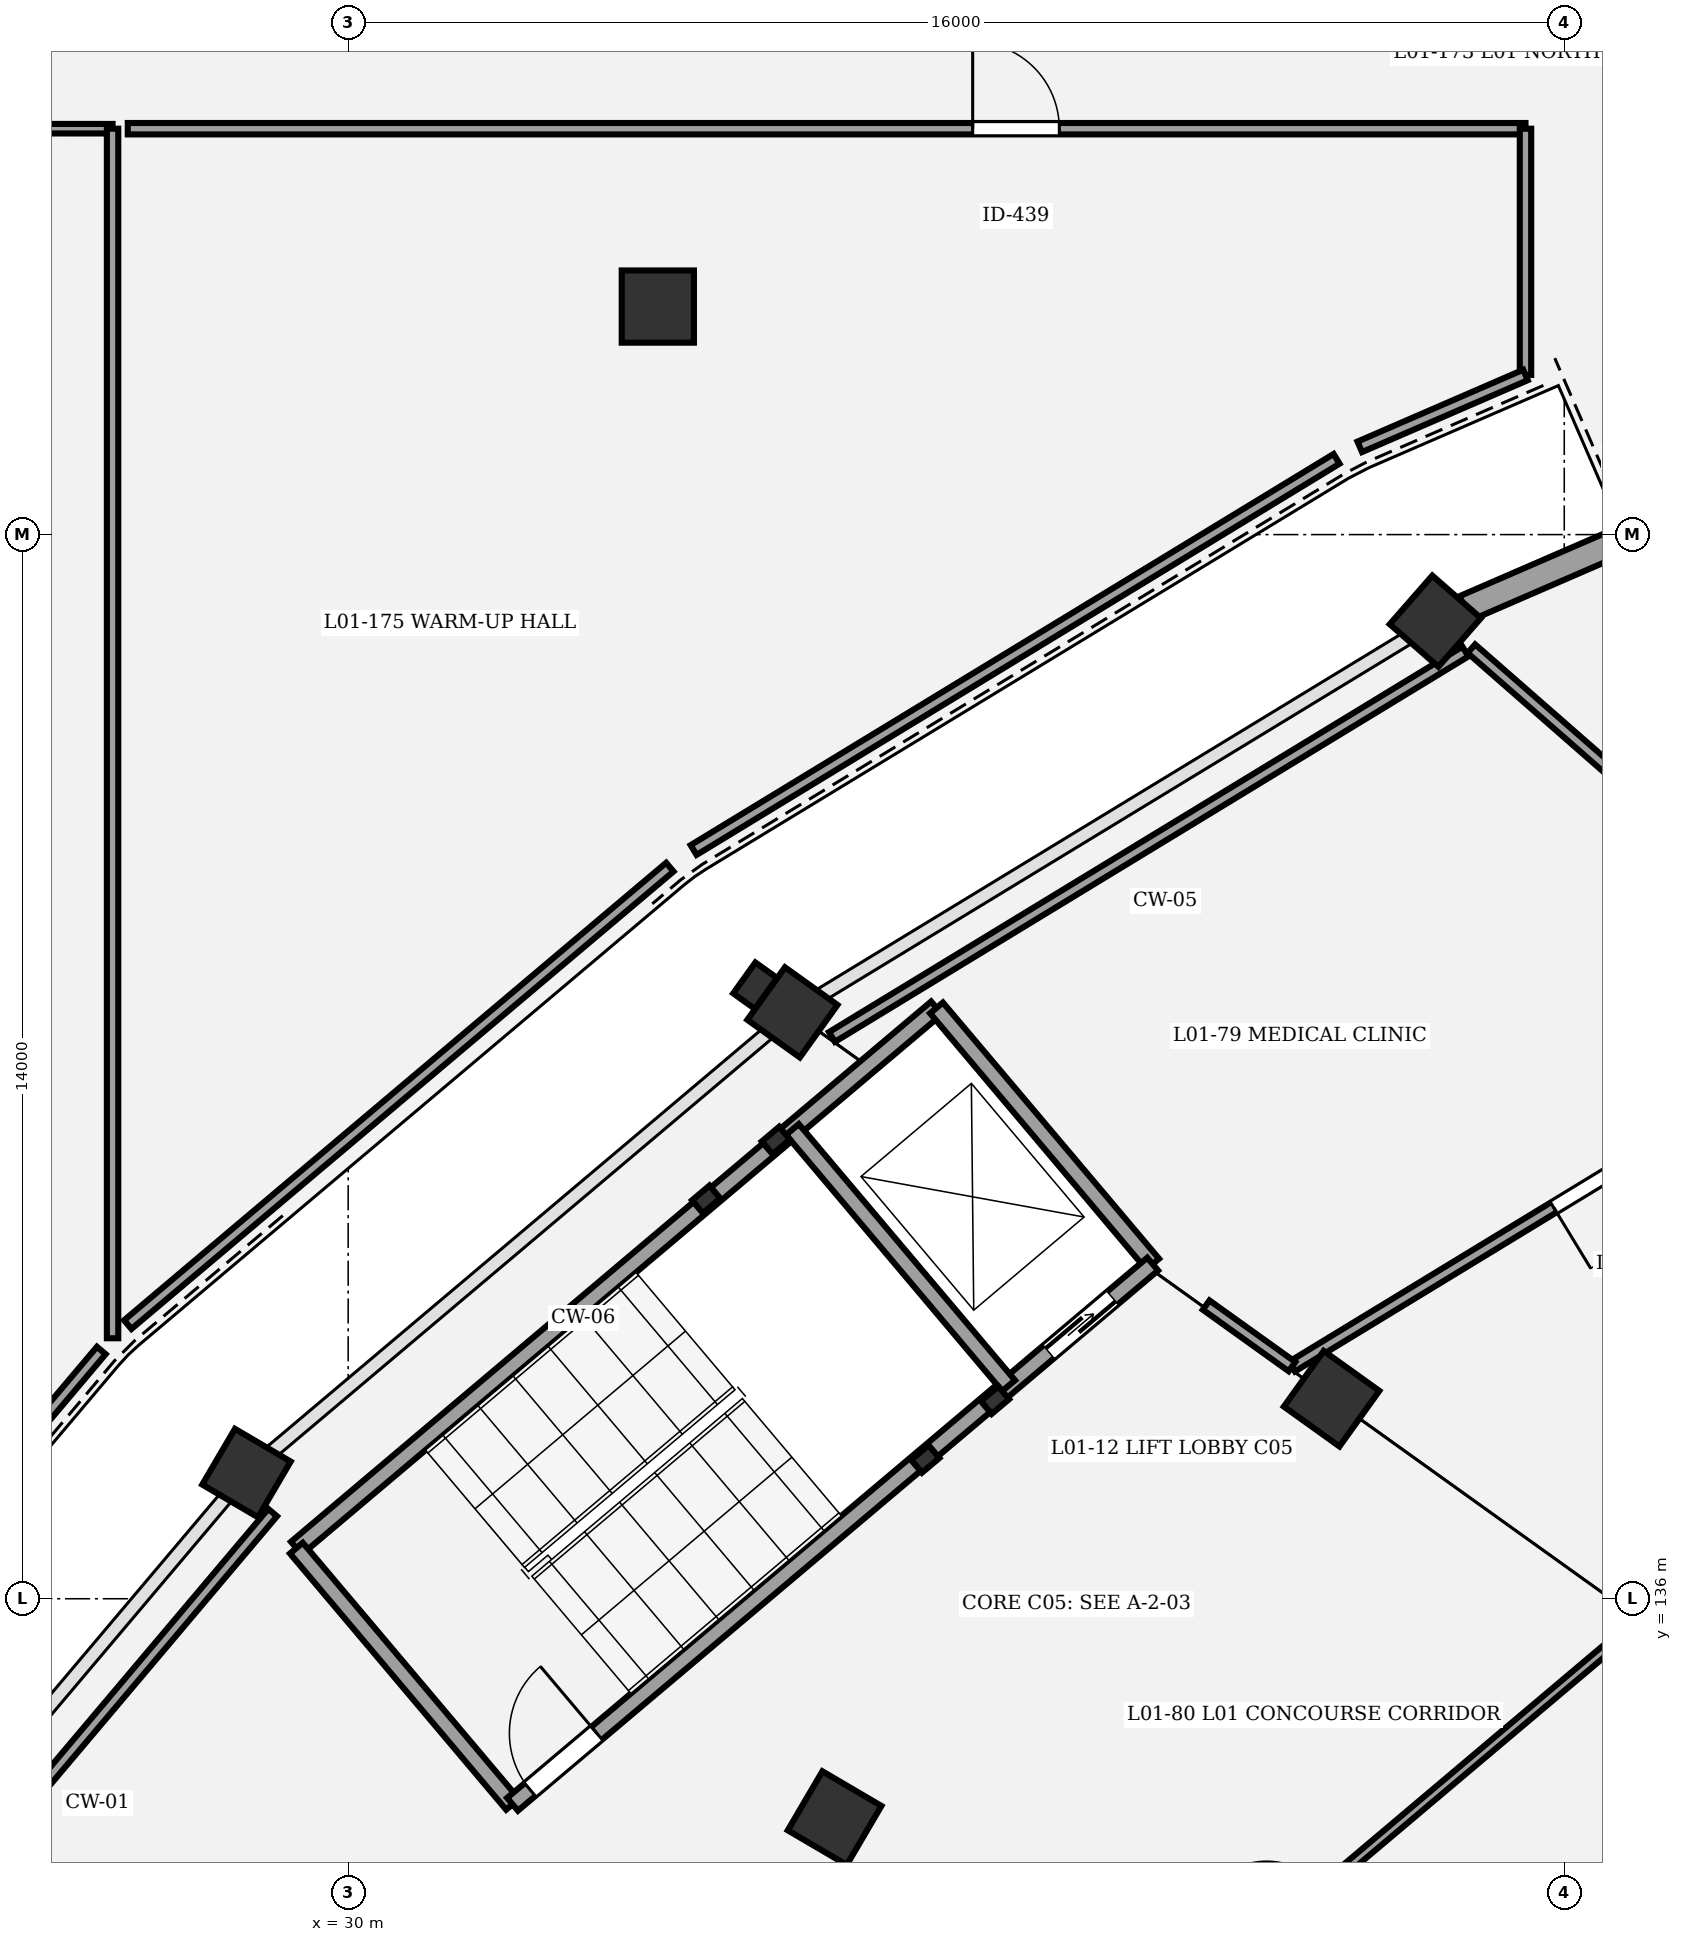
"""IFC4 building model, lengths in metres.
Left out: names, types, materials, properties, quantities, classifications, styles, units other than length and angle.
Written with IfcOpenShell. Run it as: python <this file> out.ifc"""

import sys

from ifc_helpers import new_model, si_unit, direction, frame, frame_2d, origin, origin_2d, place, context, subcontext, project, spatial, rectangle, circle, extrude, element, fill, save


model = new_model("IFC4")
c1 = context("Model", 3, precision=1e-05, world=origin(), true_north=direction((0.0, 1.0)))
c2 = subcontext(c1, "Body", "Model", "MODEL_VIEW")
j1 = project(units=[si_unit("LENGTHUNIT", "METRE"), si_unit("PLANEANGLEUNIT", "RADIAN")], contexts=[c1])
p1 = place(None, origin())
s1 = spatial("IfcSite", under=j1, at=p1, CompositionType="ELEMENT")
p2 = place(p1, origin())
s2 = spatial("IfcBuilding", under=s1, at=p2, CompositionType="ELEMENT")
p3 = place(p2, frame((0.0, 0.0, 5.4)))
s3 = spatial("IfcBuildingStorey", under=s2, at=p3, CompositionType="ELEMENT", Elevation=5.4)
p4 = place(p3, frame((44.304, 148.861, 0.0), z_axis=(0.0, 0.0, 1.0), x_axis=(-0.752529860433, 0.658558128912, 0.0)))
e1 = element("IfcColumn", 1, at=p4, inside=s3, PredefinedType="COLUMN", context=c2, shape_type="SweptSolid", body=[
    extrude(rectangle(XDim=0.85, YDim=0.85, at=origin_2d()), origin(), (0.0, 0.0, 1.0), 4.8),
])
p5 = place(p3, frame((42.939, 138.632, 0.0), z_axis=(0.0, 0.0, 1.0), x_axis=(-0.812897512265, 0.582406760395, 0.0)))
e2 = element("IfcColumn", 2, at=p5, inside=s3, PredefinedType="COLUMN", context=c2, shape_type="SweptSolid", body=[
    extrude(rectangle(XDim=0.9, YDim=0.9, at=origin_2d()), origin(), (0.0, 0.0, 1.0), 4.8),
])
p6 = place(p3, frame((35.844, 143.715, 0.0), z_axis=(0.0, 0.0, 1.0), x_axis=(-0.812897512265, 0.582406760395, 0.0)))
e3 = element("IfcColumn", 3, at=p6, inside=s3, PredefinedType="COLUMN", context=c2, shape_type="SweptSolid", body=[
    extrude(rectangle(XDim=0.85, YDim=0.85, at=origin_2d()), origin(), (0.0, 0.0, 1.0), 4.8),
])
p7 = place(p3, frame((35.354, 144.066, 0.0), z_axis=(0.0, 0.0, 1.0), x_axis=(-0.582406760395, -0.812897512265, 0.0)))
e4 = element("IfcColumn", 4, at=p7, inside=s3, PredefinedType="PILASTER", context=c2, shape_type="SweptSolid", body=[
    extrude(rectangle(XDim=0.5, YDim=0.35, at=origin_2d()), origin(), (0.0, 0.0, 1.0), 4.8),
])
p8 = place(p3, frame((36.4, 133.114, 0.0), z_axis=(0.0, 0.0, 1.0), x_axis=(-0.862513669207, 0.506033764121, 0.0)))
e5 = element("IfcColumn", 5, at=p8, inside=s3, PredefinedType="COLUMN", context=c2, shape_type="SweptSolid", body=[
    extrude(rectangle(XDim=0.9, YDim=0.9, at=origin_2d()), origin(), (0.0, 0.0, 1.0), 4.8),
])
p9 = place(p3, frame((28.662, 137.654, 0.0), z_axis=(0.0, 0.0, 1.0), x_axis=(-0.862513669207, 0.506033764121, 0.0)))
e6 = element("IfcColumn", 6, at=p9, inside=s3, PredefinedType="COLUMN", context=c2, shape_type="SweptSolid", body=[
    extrude(rectangle(XDim=0.85, YDim=0.85, at=origin_2d()), origin(), (0.0, 0.0, 1.0), 4.8),
])
p10 = place(p3, frame((34.074, 153.0, 0.0), z_axis=(0.0, 0.0, 1.0), x_axis=(1.0, 0.0, 0.0)))
e7 = element("IfcColumn", 7, at=p10, inside=s3, PredefinedType="COLUMN", context=c2, shape_type="SweptSolid", body=[
    extrude(circle(Radius=0.475, at=origin_2d()), origin(), (0.0, 0.0, 1.0), 4.8),
])
p11 = place(p3, frame((44.692, 149.029, 0.0), z_axis=(0.0, 0.0, 1.0), x_axis=(0.91749374913, 0.397750198375, 0.0)))
e8 = element("IfcWall", 8, at=p11, inside=s3, PredefinedType="STANDARD", context=c2, shape_type="SweptSolid", body=[
    extrude(rectangle(XDim=9.79, YDim=0.35, at=frame_2d((4.895, 0.0))), origin(), (0.0, 0.0, 1.0), 3.57),
])
p12 = place(p11, frame((3.995, 0.0, 0.0)))
e9 = element("IfcOpeningElement", 9, at=p12, cuts=e8, PredefinedType="OPENING", context=c2, shape_type="SweptSolid", body=[
    extrude(rectangle(XDim=1.8, YDim=2.4, at=frame_2d((0.9, 1.2))), frame((0.0, 0.185, 0.0), z_axis=(0.0, -1.0, 0.0), x_axis=(1.0, 0.0, 0.0)), (0.0, 0.0, 1.0), 0.37),
])
for number, where, z_axis, x_axis in (
    (10, (37.593, 137.839, 0.0), (0.0, 0.0, 1.0), (0.764, 0.645, 0.0)),
    (11, (38.51, 138.613, 0.0), (0.0, 0.0, 1.0), (0.764, 0.645, 0.0)),
    (12, (35.627, 142.029, 0.0), (0.0, 0.0, 1.0), (0.764, 0.645, 0.0)),
    (13, (34.71, 141.255, 0.0), (0.0, 0.0, 1.0), (0.764, 0.645, 0.0)),
):
    element("IfcColumn", number, at=place(p3, frame(where, z_axis=z_axis, x_axis=x_axis)), inside=s3, PredefinedType="COLUMN", context=c2, shape_type="SweptSolid", body=[
        extrude(rectangle(XDim=0.3, YDim=0.22, at=origin_2d()), origin(), (0.0, 0.0, 1.0), 4.8),
    ])
p13 = place(p3, frame((29.319, 136.666, 0.0), z_axis=(0.0, 0.0, 1.0), x_axis=(0.764247804305, 0.644922703598, 0.0)))
e14 = element("IfcWall", 14, at=p13, inside=s3, PredefinedType="SHEAR", context=c2, shape_type="SweptSolid", body=[
    extrude(rectangle(XDim=11.02, YDim=0.22, at=frame_2d((5.51, 0.0))), origin(), (0.0, 0.0, 1.0), 4.55),
])
p14 = place(p3, frame((32.163, 133.296, 0.0), z_axis=(0.0, 0.0, 1.0), x_axis=(-0.644904288042, 0.764263344185, 0.0)))
e15 = element("IfcWall", 15, at=p14, inside=s3, PredefinedType="SHEAR", context=c2, shape_type="SweptSolid", body=[
    extrude(rectangle(XDim=4.41, YDim=0.22, at=frame_2d((2.205, 0.0))), origin(), (0.0, 0.0, 1.0), 4.55),
])
p15 = place(p3, frame((40.585, 140.403, 0.0), z_axis=(0.0, 0.0, 1.0), x_axis=(-0.644936622785, 0.764236058159, 0.0)))
e16 = element("IfcWall", 16, at=p15, inside=s3, PredefinedType="SHEAR", context=c2, shape_type="SweptSolid", body=[
    extrude(rectangle(XDim=4.41, YDim=0.22, at=frame_2d((2.205, 0.0))), origin(), (0.0, 0.0, 1.0), 4.55),
])
p16 = place(p3, frame((32.163, 133.296, 0.0), z_axis=(0.0, 0.0, 1.0), x_axis=(0.764257018762, 0.644911784102, 0.0)))
e17 = element("IfcWall", 17, at=p16, inside=s3, PredefinedType="SHEAR", context=c2, shape_type="SweptSolid", body=[
    extrude(rectangle(XDim=11.02, YDim=0.22, at=frame_2d((5.51, 0.0))), origin(), (0.0, 0.0, 1.0), 4.55),
])
p17 = place(p16, frame((0.3, 0.0, 0.0)))
e18 = element("IfcOpeningElement", 18, at=p17, cuts=e17, PredefinedType="OPENING", context=c2, shape_type="SweptSolid", body=[
    extrude(rectangle(XDim=1.15, YDim=2.15, at=frame_2d((0.575, 1.075))), frame((0.0, 0.12, 0.0), z_axis=(0.0, -1.0, 0.0), x_axis=(1.0, 0.0, 0.0)), (0.0, 0.0, 1.0), 0.24),
])
p18 = place(p16, frame((9.23, 0.0, 0.0)))
e19 = element("IfcOpeningElement", 19, at=p18, cuts=e17, PredefinedType="OPENING", context=c2, shape_type="SweptSolid", body=[
    extrude(rectangle(XDim=1.1, YDim=2.15, at=frame_2d((0.55, 1.075))), frame((0.0, 0.12, 0.0), z_axis=(0.0, -1.0, 0.0), x_axis=(1.0, 0.0, 0.0)), (0.0, 0.0, 1.0), 0.24),
])
p19 = place(p3, frame((38.689, 138.803, 0.0), z_axis=(0.0, 0.0, 1.0), x_axis=(-0.644904288042, 0.764263344185, 0.0)))
e20 = element("IfcWall", 20, at=p19, inside=s3, PredefinedType="SHEAR", context=c2, shape_type="SweptSolid", body=[
    extrude(rectangle(XDim=4.41, YDim=0.22, at=frame_2d((2.205, 0.0))), origin(), (0.0, 0.0, 1.0), 4.55),
])
p20 = place(p3, frame((50.105, 143.731, 0.0), z_axis=(0.0, 0.0, 1.0), x_axis=(-0.854321649351, -0.519744667554, 0.0)))
e21 = element("IfcWall", 21, at=p20, inside=s3, PredefinedType="PARTITIONING", context=c2, shape_type="SweptSolid", body=[
    extrude(rectangle(XDim=8.999, YDim=0.15, at=frame_2d((4.499, 0.0))), origin(), (0.0, 0.0, 1.0), 3.55),
])
p21 = place(p20, frame((4.029, 0.0, 0.0)))
e22 = element("IfcOpeningElement", 22, at=p21, cuts=e21, PredefinedType="OPENING", context=c2, shape_type="SweptSolid", body=[
    extrude(rectangle(XDim=0.94, YDim=2.1, at=frame_2d((0.47, 1.05))), frame((0.0, 0.085, 0.0), z_axis=(0.0, -1.0, 0.0), x_axis=(1.0, 0.0, 0.0)), (0.0, 0.0, 1.0), 0.17),
])
p22 = place(p3, frame((40.867, 130.539, 0.0), z_axis=(0.0, 0.0, 1.0), x_axis=(0.764249122867, 0.644921141068, 0.0)))
e23 = element("IfcWall", 23, at=p22, inside=s3, PredefinedType="PARTITIONING", context=c2, shape_type="SweptSolid", body=[
    extrude(rectangle(XDim=7.99, YDim=0.125, at=frame_2d((3.995, 0.0))), origin(), (0.0, 0.0, 1.0), 3.55),
])
p23 = place(p22, frame((1.594, 0.0, 0.0)))
e24 = element("IfcOpeningElement", 24, at=p23, cuts=e23, PredefinedType="OPENING", context=c2, shape_type="SweptSolid", body=[
    extrude(rectangle(XDim=0.98, YDim=2.1, at=frame_2d((0.49, 1.05))), frame((0.0, 0.073, 0.0), z_axis=(0.0, -1.0, 0.0), x_axis=(1.0, 0.0, 0.0)), (0.0, 0.0, 1.0), 0.145),
])
p24 = place(p3, frame((13.469, 155.343, 0.0), z_axis=(0.0, 0.0, 1.0), x_axis=(0.99999997621, -0.00021812629, 0.0)))
e25 = element("IfcWall", 25, at=p24, inside=s3, PredefinedType="PARTITIONING", context=c2, shape_type="SweptSolid", body=[
    extrude(rectangle(XDim=13.431, YDim=0.125, at=frame_2d((6.716, 0.0))), origin(), (0.0, 0.0, 1.0), 3.55),
])
p25 = place(p24, frame((7.919, 0.0, 0.0)))
e26 = element("IfcOpeningElement", 26, at=p25, cuts=e25, PredefinedType="OPENING", context=c2, shape_type="SweptSolid", body=[
    extrude(rectangle(XDim=1.1, YDim=2.1, at=frame_2d((0.55, 1.05))), frame((0.0, 0.073, 0.0), z_axis=(0.0, -1.0, 0.0), x_axis=(1.0, 0.0, 0.0)), (0.0, 0.0, 1.0), 0.145),
])
p26 = place(p3, frame((27.1, 155.34, 0.0), z_axis=(0.0, 0.0, 1.0), x_axis=(1.0, 0.0, 0.0)))
e27 = element("IfcWall", 27, at=p26, inside=s3, PredefinedType="PARTITIONING", context=c2, shape_type="SweptSolid", body=[
    extrude(rectangle(XDim=18.39, YDim=0.15, at=frame_2d((9.195, 0.0))), origin(), (0.0, 0.0, 1.0), 3.55),
])
p27 = place(p26, frame((11.116, 0.0, 0.0)))
e28 = element("IfcOpeningElement", 28, at=p27, cuts=e27, PredefinedType="OPENING", context=c2, shape_type="SweptSolid", body=[
    extrude(rectangle(XDim=1.14, YDim=2.1, at=frame_2d((0.57, 1.05))), frame((0.0, 0.085, 0.0), z_axis=(0.0, -1.0, 0.0), x_axis=(1.0, 0.0, 0.0)), (0.0, 0.0, 1.0), 0.17),
])
p28 = place(p3, frame((50.18, 143.772, 0.0), z_axis=(0.0, 0.0, 1.0), x_axis=(-0.752576694707, 0.658504607869, 0.0)))
e29 = element("IfcWall", 29, at=p28, inside=s3, PredefinedType="PARTITIONING", context=c2, shape_type="SweptSolid", body=[
    extrude(rectangle(XDim=7.178, YDim=0.15, at=frame_2d((3.589, 0.0))), origin(), (0.0, 0.0, 1.0), 3.55),
])
p29 = place(p3, frame((36.365, 143.391, 0.0), z_axis=(0.0, 0.0, 1.0), x_axis=(0.854323689683, 0.519741313777, 0.0)))
e30 = element("IfcWall", 30, at=p29, inside=s3, PredefinedType="PARTITIONING", context=c2, shape_type="SweptSolid", body=[
    extrude(rectangle(XDim=9.756, YDim=0.15, at=frame_2d((4.878, 0.0))), origin(), (0.0, 0.0, 1.0), 3.55),
])
p30 = place(p3, frame((42.418, 139.054, 0.0), z_axis=(0.0, 0.0, 1.0), x_axis=(-0.812925279681, 0.582368001916, 0.0)))
e31 = element("IfcWall", 31, at=p30, inside=s3, PredefinedType="PARTITIONING", context=c2, shape_type="SweptSolid", body=[
    extrude(rectangle(XDim=1.389, YDim=0.15, at=frame_2d((0.695, 0.0))), origin(), (0.0, 0.0, 1.0), 3.55),
])
p31 = place(p3, frame((23.344, 130.428, 0.0), z_axis=(0.0, 0.0, 1.0), x_axis=(0.645169991826, 0.764039057671, 0.0)))
e32 = element("IfcWall", 32, at=p31, inside=s3, PredefinedType="PARTITIONING", context=c2, shape_type="SweptSolid", body=[
    extrude(rectangle(XDim=8.776, YDim=0.15, at=frame_2d((4.388, 0.0))), origin(), (0.0, 0.0, 1.0), 3.55),
])
p32 = place(p3, frame((26.752, 139.266, 0.0), z_axis=(0.0, 0.0, 1.0), x_axis=(-0.645180125691, -0.764030500316, 0.0)))
e33 = element("IfcWall", 33, at=p32, inside=s3, PredefinedType="PARTITIONING", context=c2, shape_type="SweptSolid", body=[
    extrude(rectangle(XDim=9.151, YDim=0.15, at=frame_2d((4.576, 0.0))), origin(), (0.0, 0.0, 1.0), 3.55),
])
p33 = place(p3, frame((26.9, 155.34, 0.0), z_axis=(0.0, 0.0, 1.0), x_axis=(0.0, -1.0, 0.0)))
e34 = element("IfcWall", 34, at=p33, inside=s3, PredefinedType="PARTITIONING", context=c2, shape_type="SweptSolid", body=[
    extrude(rectangle(XDim=15.913, YDim=0.15, at=frame_2d((7.957, 0.0))), origin(), (0.0, 0.0, 1.0), 3.55),
])
p34 = place(p3, frame((43.004, 150.997, 0.0), z_axis=(0.0, 0.0, 1.0), x_axis=(-0.854333268174, -0.519725568826, 0.0)))
e35 = element("IfcWall", 35, at=p34, inside=s3, PredefinedType="PARTITIONING", context=c2, shape_type="SweptSolid", body=[
    extrude(rectangle(XDim=9.902, YDim=0.15, at=frame_2d((4.951, 0.0))), origin(), (0.0, 0.0, 1.0), 3.55),
])
p35 = place(p3, frame((34.232, 145.625, 0.0), z_axis=(0.0, 0.0, 1.0), x_axis=(-0.764245949545, -0.644924901523, 0.0)))
e36 = element("IfcWall", 36, at=p35, inside=s3, PredefinedType="PARTITIONING", context=c2, shape_type="SweptSolid", body=[
    extrude(rectangle(XDim=9.332, YDim=0.15, at=frame_2d((4.666, 0.0))), origin(), (0.0, 0.0, 1.0), 3.55),
])
p36 = place(p3, frame((45.49, 155.34, 0.0), z_axis=(0.0, 0.0, 1.0), x_axis=(0.0, -1.0, 0.0)))
e37 = element("IfcWall", 37, at=p36, inside=s3, PredefinedType="PARTITIONING", context=c2, shape_type="SweptSolid", body=[
    extrude(rectangle(XDim=3.24, YDim=0.15, at=frame_2d((1.62, 0.0))), origin(), (0.0, 0.0, 1.0), 3.55),
])
p37 = place(p3, frame((45.49, 152.1, 0.0), z_axis=(0.0, 0.0, 1.0), x_axis=(-0.917484400903, -0.397771761314, 0.0)))
e38 = element("IfcWall", 38, at=p37, inside=s3, PredefinedType="PARTITIONING", context=c2, shape_type="SweptSolid", body=[
    extrude(rectangle(XDim=2.376, YDim=0.15, at=frame_2d((1.188, 0.0))), origin(), (0.0, 0.0, 1.0), 3.55),
])
p38 = place(p17, origin())
e39 = element("IfcDoor", 39, at=p38, inside=s3, OperationType="SINGLE_SWING_RIGHT", PredefinedType="DOOR", context=c2, shape_type="SweptSolid", body=[
    extrude(rectangle(XDim=1.15, YDim=2.15, at=frame_2d((0.575, 1.075))), frame((0.0, 0.025, 0.0), z_axis=(0.0, -1.0, 0.0), x_axis=(1.0, 0.0, 0.0)), (0.0, 0.0, 1.0), 0.05),
])
fill(e18, e39)
p39 = place(p18, origin())
e40 = element("IfcDoor", 40, at=p39, inside=s3, OperationType="DOUBLE_DOOR_SLIDING", PredefinedType="DOOR", context=c2, shape_type="SweptSolid", body=[
    extrude(rectangle(XDim=1.1, YDim=2.15, at=frame_2d((0.55, 1.075))), frame((0.0, 0.025, 0.0), z_axis=(0.0, -1.0, 0.0), x_axis=(1.0, 0.0, 0.0)), (0.0, 0.0, 1.0), 0.05),
])
fill(e19, e40)
p40 = place(p21, origin())
e41 = element("IfcDoor", 41, at=p40, inside=s3, OperationType="SINGLE_SWING_RIGHT", PredefinedType="DOOR", context=c2, shape_type="SweptSolid", body=[
    extrude(rectangle(XDim=0.94, YDim=2.1, at=frame_2d((0.47, 1.05))), frame((0.0, 0.025, 0.0), z_axis=(0.0, -1.0, 0.0), x_axis=(1.0, 0.0, 0.0)), (0.0, 0.0, 1.0), 0.05),
])
fill(e22, e41)
p41 = place(p27, origin())
e42 = element("IfcDoor", 42, at=p41, inside=s3, OperationType="SINGLE_SWING_LEFT", PredefinedType="DOOR", context=c2, shape_type="SweptSolid", body=[
    extrude(rectangle(XDim=1.14, YDim=2.1, at=frame_2d((0.57, 1.05))), frame((0.0, 0.025, 0.0), z_axis=(0.0, -1.0, 0.0), x_axis=(1.0, 0.0, 0.0)), (0.0, 0.0, 1.0), 0.05),
])
fill(e28, e42)
save(model, sys.argv[1])
